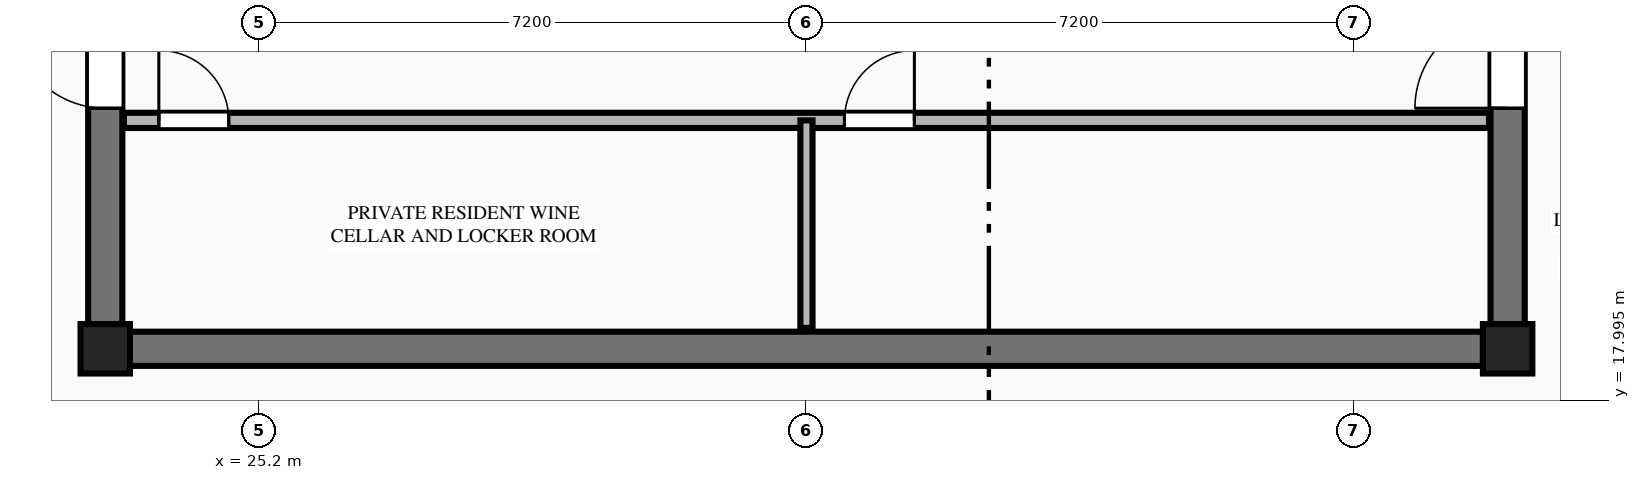
"""IFC4 building model, lengths in metres.
Left out: names, types, materials, properties, quantities, classifications, styles, units other than length and angle.
Written with IfcOpenShell. Run it as: python <this file> out.ifc"""

import sys

from ifc_helpers import new_model, si_unit, direction, frame, frame_2d, origin, origin_2d, place, context, subcontext, project, spatial, rectangle, extrude, element, fill, save


model = new_model("IFC4")
c1 = context("Model", 3, precision=1e-05, world=origin(), true_north=direction((0.0, 1.0)))
c2 = subcontext(c1, "Body", "Model", "MODEL_VIEW")
j1 = project(units=[si_unit("LENGTHUNIT", "METRE"), si_unit("PLANEANGLEUNIT", "RADIAN")], contexts=[c1])
p1 = place(None, origin())
s1 = spatial("IfcSite", under=j1, at=p1, CompositionType="ELEMENT")
p2 = place(p1, origin())
s2 = spatial("IfcBuilding", under=s1, at=p2, CompositionType="ELEMENT")
p3 = place(p2, frame((0.0, 0.0, 259.85)))
s3 = spatial("IfcBuildingStorey", under=s2, at=p3, CompositionType="ELEMENT", Elevation=259.85)
for number, where, z_axis, x_axis in (
    (1, (23.175, 18.675, 0.0), (0.0, 0.0, 1.0), (1.0, 0.0, 0.0)),
    (2, (41.625, 18.675, 0.0), (0.0, 0.0, 1.0), (1.0, 0.0, 0.0)),
):
    element("IfcColumn", number, at=place(p3, frame(where, z_axis=z_axis, x_axis=x_axis)), inside=s3, PredefinedType="COLUMN", context=c2, shape_type="SweptSolid", body=[
        extrude(rectangle(XDim=0.65, YDim=0.65, at=origin_2d()), origin(), (0.0, 0.0, 1.0), 3.65),
    ])
p4 = place(p3, frame((23.5, 18.675, 0.0), z_axis=(0.0, 0.0, 1.0), x_axis=(1.0, 0.0, 0.0)))
e3 = element("IfcWall", 3, at=p4, inside=s3, PredefinedType="SHEAR", context=c2, shape_type="SweptSolid", body=[
    extrude(rectangle(XDim=17.8, YDim=0.45, at=frame_2d((8.9, 0.0))), origin(), (0.0, 0.0, 1.0), 3.45),
])
p5 = place(p3, frame((23.175, 19.0, 0.0), z_axis=(0.0, 0.0, 1.0), x_axis=(0.0, 1.0, 0.0)))
e4 = element("IfcWall", 4, at=p5, inside=s3, PredefinedType="SHEAR", context=c2, shape_type="SweptSolid", body=[
    extrude(rectangle(XDim=13.8, YDim=0.45, at=frame_2d((6.9, 0.0))), origin(), (0.0, 0.0, 1.0), 3.45),
])
p6 = place(p5, frame((2.84, 0.0, 0.0)))
e5 = element("IfcOpeningElement", 5, at=p6, cuts=e4, PredefinedType="OPENING", context=c2, shape_type="SweptSolid", body=[
    extrude(rectangle(XDim=1.22, YDim=2.25, at=frame_2d((0.61, 1.125))), frame((0.0, 0.235, 0.0), z_axis=(0.0, -1.0, 0.0), x_axis=(1.0, 0.0, 0.0)), (0.0, 0.0, 1.0), 0.47),
])
p7 = place(p3, frame((41.625, 19.0, 0.0), z_axis=(0.0, 0.0, 1.0), x_axis=(0.0, 1.0, 0.0)))
e6 = element("IfcWall", 6, at=p7, inside=s3, PredefinedType="SHEAR", context=c2, shape_type="SweptSolid", body=[
    extrude(rectangle(XDim=13.8, YDim=0.45, at=frame_2d((6.9, 0.0))), origin(), (0.0, 0.0, 1.0), 3.45),
])
p8 = place(p7, frame((2.84, 0.0, 0.0)))
e7 = element("IfcOpeningElement", 7, at=p8, cuts=e6, PredefinedType="OPENING", context=c2, shape_type="SweptSolid", body=[
    extrude(rectangle(XDim=1.22, YDim=2.25, at=frame_2d((0.61, 1.125))), frame((0.0, 0.235, 0.0), z_axis=(0.0, -1.0, 0.0), x_axis=(1.0, 0.0, 0.0)), (0.0, 0.0, 1.0), 0.47),
])
p9 = place(p3, frame((23.42, 21.68, 0.0), z_axis=(0.0, 0.0, 1.0), x_axis=(1.0, 0.0, 0.0)))
e8 = element("IfcWall", 8, at=p9, inside=s3, PredefinedType="PLUMBINGWALL", context=c2, shape_type="SweptSolid", body=[
    extrude(rectangle(XDim=17.96, YDim=0.2, at=frame_2d((8.98, 0.0))), origin(), (0.0, 0.0, 1.0), 3.45),
])
p10 = place(p9, frame((0.46, 0.0, 0.0)))
e9 = element("IfcOpeningElement", 9, at=p10, cuts=e8, PredefinedType="OPENING", context=c2, shape_type="SweptSolid", body=[
    extrude(rectangle(XDim=0.92, YDim=2.15, at=frame_2d((0.46, 1.075))), frame((0.0, 0.11, 0.0), z_axis=(0.0, -1.0, 0.0), x_axis=(1.0, 0.0, 0.0)), (0.0, 0.0, 1.0), 0.22),
])
p11 = place(p9, frame((9.48, 0.0, 0.0)))
e10 = element("IfcOpeningElement", 10, at=p11, cuts=e8, PredefinedType="OPENING", context=c2, shape_type="SweptSolid", body=[
    extrude(rectangle(XDim=0.92, YDim=2.15, at=frame_2d((0.46, 1.075))), frame((0.0, 0.11, 0.0), z_axis=(0.0, -1.0, 0.0), x_axis=(1.0, 0.0, 0.0)), (0.0, 0.0, 1.0), 0.22),
])
p12 = place(p3, frame((32.4, 18.95, 0.0), z_axis=(0.0, 0.0, 1.0), x_axis=(0.0, 1.0, 0.0)))
e11 = element("IfcWall", 11, at=p12, inside=s3, PredefinedType="PARTITIONING", context=c2, shape_type="SweptSolid", body=[
    extrude(rectangle(XDim=2.73, YDim=0.16, at=frame_2d((1.365, 0.0))), origin(), (0.0, 0.0, 1.0), 3.45),
])
p13 = place(p6, origin())
e12 = element("IfcDoor", 12, at=p13, inside=s3, OperationType="SINGLE_SWING_RIGHT", PredefinedType="DOOR", context=c2, shape_type="SweptSolid", body=[
    extrude(rectangle(XDim=1.22, YDim=2.25, at=frame_2d((0.61, 1.125))), frame((0.0, 0.025, 0.0), z_axis=(0.0, -1.0, 0.0), x_axis=(1.0, 0.0, 0.0)), (0.0, 0.0, 1.0), 0.05),
])
fill(e5, e12)
p14 = place(p8, origin())
e13 = element("IfcDoor", 13, at=p14, inside=s3, OperationType="SINGLE_SWING_LEFT", PredefinedType="DOOR", context=c2, shape_type="SweptSolid", body=[
    extrude(rectangle(XDim=1.22, YDim=2.25, at=frame_2d((0.61, 1.125))), frame((0.0, 0.025, 0.0), z_axis=(0.0, -1.0, 0.0), x_axis=(1.0, 0.0, 0.0)), (0.0, 0.0, 1.0), 0.05),
])
fill(e7, e13)
p15 = place(p10, origin())
e14 = element("IfcDoor", 14, at=p15, inside=s3, OperationType="SINGLE_SWING_LEFT", PredefinedType="DOOR", context=c2, shape_type="SweptSolid", body=[
    extrude(rectangle(XDim=0.92, YDim=2.15, at=frame_2d((0.46, 1.075))), frame((0.0, 0.025, 0.0), z_axis=(0.0, -1.0, 0.0), x_axis=(1.0, 0.0, 0.0)), (0.0, 0.0, 1.0), 0.05),
])
fill(e9, e14)
p16 = place(p11, origin())
e15 = element("IfcDoor", 15, at=p16, inside=s3, OperationType="SINGLE_SWING_RIGHT", PredefinedType="DOOR", context=c2, shape_type="SweptSolid", body=[
    extrude(rectangle(XDim=0.92, YDim=2.15, at=frame_2d((0.46, 1.075))), frame((0.0, 0.025, 0.0), z_axis=(0.0, -1.0, 0.0), x_axis=(1.0, 0.0, 0.0)), (0.0, 0.0, 1.0), 0.05),
])
fill(e10, e15)
save(model, sys.argv[1])
